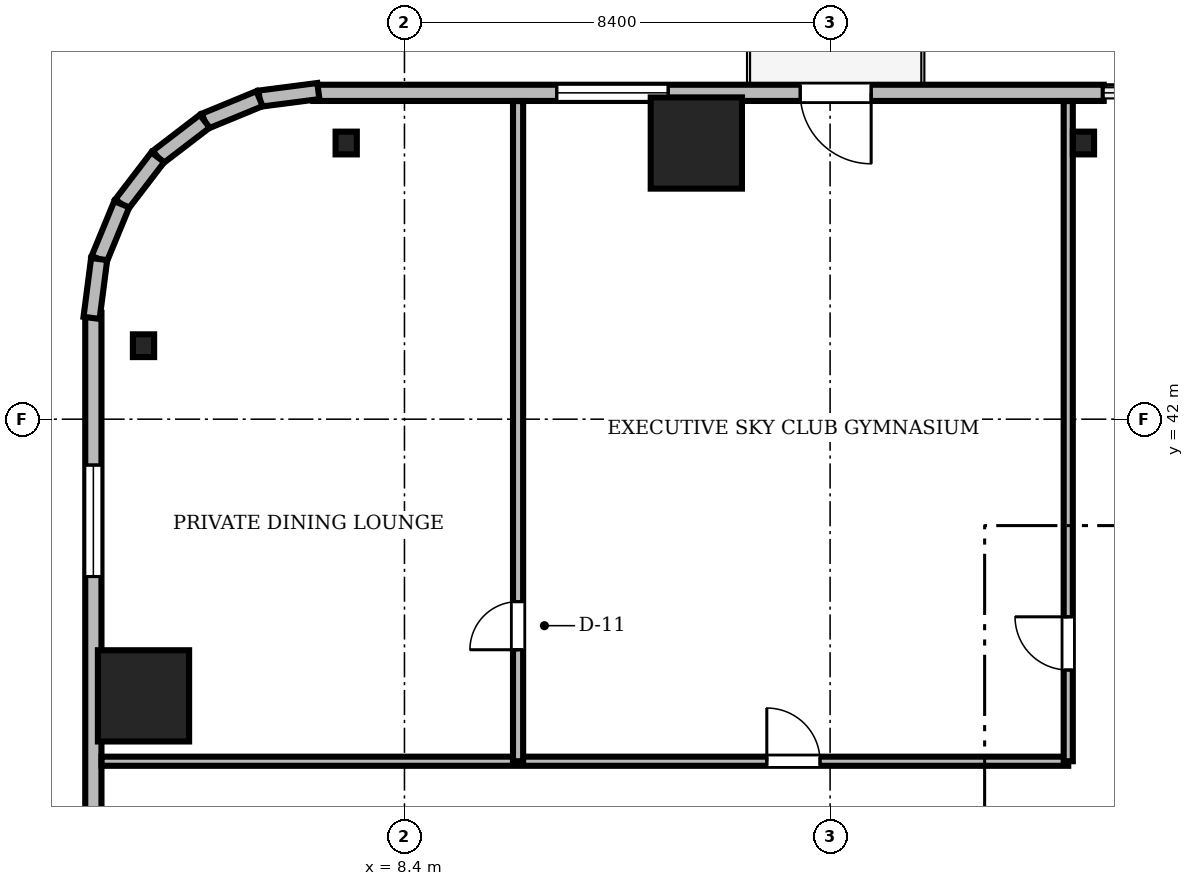
"""IFC4 building model, lengths in metres.
Left out: names, types, materials, properties, quantities, classifications, styles, units other than length and angle.
Written with IfcOpenShell. Run it as: python <this file> out.ifc"""

import sys

from ifc_helpers import new_model, si_unit, direction, frame, frame_2d, origin, origin_2d, place, context, subcontext, project, spatial, rectangle, i_section, extrude, source, transform, mapped, element, fill, save


model = new_model("IFC4")
c1 = context("Model", 3, precision=1e-05, world=origin(), true_north=direction((0.0, 1.0)))
c2 = subcontext(c1, "Body", "Model", "MODEL_VIEW")
j1 = project(units=[si_unit("LENGTHUNIT", "METRE"), si_unit("PLANEANGLEUNIT", "RADIAN")], contexts=[c1])
p1 = place(None, origin())
s1 = spatial("IfcSite", under=j1, at=p1, CompositionType="ELEMENT")
p2 = place(p1, origin())
s2 = spatial("IfcBuilding", under=s1, at=p2, CompositionType="ELEMENT")
p3 = place(p2, frame((0.0, 0.0, 38.55)))
s3 = spatial("IfcBuildingStorey", under=s2, at=p3, CompositionType="ELEMENT", Elevation=38.55)
m1 = source(origin(), c2, "Body", "SweptSolid", [
    extrude(rectangle(XDim=1.8, YDim=1.8, at=origin_2d()), origin(), (0.0, 0.0, 1.0), 3.41),
])
for number, where, z_axis, x_axis in (
    (1, (14.16, 47.45, 0.0), (0.0, 0.0, 1.0), (1.0, 0.0, 0.0)),
    (2, (3.25, 36.54, 0.0), (0.0, 0.0, 1.0), (1.0, 0.0, 0.0)),
):
    element("IfcColumn", number, at=place(p3, frame(where, z_axis=z_axis, x_axis=x_axis)), inside=s3, PredefinedType="COLUMN", context=c2, shape_type="MappedRepresentation", body=[
        mapped(m1, transform((0.0, 0.0, 0.0), scale=1.0)),
    ])
m2 = source(origin(), c2, "Body", "SweptSolid", [
    extrude(i_section(OverallWidth=0.419, OverallDepth=0.449, WebThickness=0.031, FlangeThickness=0.048, FilletRadius=0.015, at=origin_2d()), origin(), (0.0, 0.0, 1.0), 3.41),
])
for number, where, z_axis, x_axis in (
    (3, (21.8, 47.45, 0.0), (0.0, 0.0, 1.0), (1.0, 0.0, 0.0)),
    (4, (7.25, 47.45, 0.0), (0.0, 0.0, 1.0), (1.0, 0.0, 0.0)),
    (5, (3.25, 43.45, 0.0), (0.0, 0.0, 1.0), (1.0, 0.0, 0.0)),
):
    element("IfcColumn", number, at=place(p3, frame(where, z_axis=z_axis, x_axis=x_axis)), inside=s3, PredefinedType="COLUMN", context=c2, shape_type="MappedRepresentation", body=[
        mapped(m2, transform((0.0, 0.0, 0.0), scale=1.0)),
    ])
m3 = source(origin(), c2, "Body", "SweptSolid", [
    extrude(rectangle(XDim=15.6, YDim=0.32, at=frame_2d((7.8, 0.0))), origin(), (0.0, 0.0, 1.0), 3.41),
])
p4 = place(p3, frame((22.2, 48.44, 0.0), z_axis=(0.0, 0.0, 1.0), x_axis=(-1.0, 0.0, 0.0)))
e6 = element("IfcWall", 6, at=p4, inside=s3, PredefinedType="SOLIDWALL", context=c2, shape_type="MappedRepresentation", body=[
    mapped(m3, transform((0.0, 0.0, 0.0), scale=1.0)),
])
m4 = source(origin(), c2, "Body", "SweptSolid", [
    extrude(rectangle(XDim=1.4, YDim=2.3, at=frame_2d((0.7, 1.15))), frame((0.0, 0.17, 0.0), z_axis=(0.0, -1.0, 0.0), x_axis=(1.0, 0.0, 0.0)), (0.0, 0.0, 1.0), 0.34),
])
p5 = place(p4, frame((4.59, 0.0, 0.0)))
e7 = element("IfcOpeningElement", 7, at=p5, cuts=e6, PredefinedType="OPENING", context=c2, shape_type="MappedRepresentation", body=[
    mapped(m4, transform((0.0, 0.0, 0.0), scale=1.0)),
])
m5 = source(origin(), c2, "Body", "SweptSolid", [
    extrude(rectangle(XDim=2.2, YDim=2.4, at=frame_2d((1.1, 1.2))), frame((0.0, 0.17, 0.0), z_axis=(0.0, -1.0, 0.0), x_axis=(1.0, 0.0, 0.0)), (0.0, 0.0, 1.0), 0.34),
])
p6 = place(p4, frame((8.595, 0.0, 0.72)))
e8 = element("IfcOpeningElement", 8, at=p6, cuts=e6, PredefinedType="OPENING", context=c2, shape_type="MappedRepresentation", body=[
    mapped(m5, transform((0.0, 0.0, 0.0), scale=1.0)),
])
m6 = source(origin(), c2, "Body", "SweptSolid", [
    extrude(rectangle(XDim=15.6, YDim=0.32, at=frame_2d((7.8, 0.0))), origin(), (0.0, 0.0, 1.0), 3.41),
])
p7 = place(p3, frame((2.26, 44.1, 0.0), z_axis=(0.0, 0.0, 1.0), x_axis=(0.0, -1.0, 0.0)))
e9 = element("IfcWall", 9, at=p7, inside=s3, PredefinedType="SOLIDWALL", context=c2, shape_type="MappedRepresentation", body=[
    mapped(m6, transform((0.0, 0.0, 0.0), scale=1.0)),
])
p8 = place(p7, frame((3.005, 0.0, 0.72)))
e10 = element("IfcOpeningElement", 10, at=p8, cuts=e9, PredefinedType="OPENING", context=c2, shape_type="MappedRepresentation", body=[
    mapped(m5, transform((0.0, 0.0, 0.0), scale=1.0)),
])
m7 = source(origin(), c2, "Body", "SweptSolid", [
    extrude(rectangle(XDim=1.17, YDim=0.32, at=frame_2d((0.585, 0.0))), origin(), (0.0, 0.0, 1.0), 3.41),
])
p9 = place(p3, frame((6.7, 48.476, 0.0), z_axis=(0.0, 0.0, 1.0), x_axis=(-0.991735963317, -0.128295670475, 0.0)))
e11 = element("IfcWall", 11, at=p9, inside=s3, PredefinedType="SOLIDWALL", context=c2, shape_type="MappedRepresentation", body=[
    mapped(m7, transform((0.0, 0.0, 0.0), scale=1.0)),
])
m8 = source(origin(), c2, "Body", "SweptSolid", [
    extrude(rectangle(XDim=1.169, YDim=0.32, at=frame_2d((0.584, 0.0))), origin(), (0.0, 0.0, 1.0), 3.41),
])
p10 = place(p3, frame((5.54, 48.325, 0.0), z_axis=(0.0, 0.0, 1.0), x_axis=(-0.924552646638, -0.381054331552, 0.0)))
e12 = element("IfcWall", 12, at=p10, inside=s3, PredefinedType="SOLIDWALL", context=c2, shape_type="MappedRepresentation", body=[
    mapped(m8, transform((0.0, 0.0, 0.0), scale=1.0)),
])
m9 = source(origin(), c2, "Body", "SweptSolid", [
    extrude(rectangle(XDim=1.169, YDim=0.32, at=frame_2d((0.584, 0.0))), origin(), (0.0, 0.0, 1.0), 3.41),
])
p11 = place(p3, frame((4.459, 47.88, 0.0), z_axis=(0.0, 0.0, 1.0), x_axis=(-0.793663520347, -0.608356981114, 0.0)))
e13 = element("IfcWall", 13, at=p11, inside=s3, PredefinedType="SOLIDWALL", context=c2, shape_type="MappedRepresentation", body=[
    mapped(m9, transform((0.0, 0.0, 0.0), scale=1.0)),
])
m10 = source(origin(), c2, "Body", "SweptSolid", [
    extrude(rectangle(XDim=1.169, YDim=0.32, at=frame_2d((0.584, 0.0))), origin(), (0.0, 0.0, 1.0), 3.41),
])
p12 = place(p3, frame((3.531, 47.169, 0.0), z_axis=(0.0, 0.0, 1.0), x_axis=(-0.608387696831, -0.793639975269, 0.0)))
e14 = element("IfcWall", 14, at=p12, inside=s3, PredefinedType="SOLIDWALL", context=c2, shape_type="MappedRepresentation", body=[
    mapped(m10, transform((0.0, 0.0, 0.0), scale=1.0)),
])
p13 = place(p3, frame((2.82, 46.241, 0.0), z_axis=(0.0, 0.0, 1.0), x_axis=(-0.381054331552, -0.924552646638, 0.0)))
e15 = element("IfcWall", 15, at=p13, inside=s3, PredefinedType="SOLIDWALL", context=c2, shape_type="MappedRepresentation", body=[
    mapped(m8, transform((0.0, 0.0, 0.0), scale=1.0)),
])
p14 = place(p3, frame((2.375, 45.16, 0.0), z_axis=(0.0, 0.0, 1.0), x_axis=(-0.128295670475, -0.991735963317, 0.0)))
e16 = element("IfcWall", 16, at=p14, inside=s3, PredefinedType="SOLIDWALL", context=c2, shape_type="MappedRepresentation", body=[
    mapped(m7, transform((0.0, 0.0, 0.0), scale=1.0)),
])
m11 = source(origin(), c2, "Body", "SweptSolid", [
    extrude(rectangle(XDim=19.078, YDim=0.18, at=frame_2d((9.539, 0.0))), origin(), (0.0, 0.0, 1.0), 2.652),
])
p15 = place(p3, frame((2.422, 35.25, 0.0), z_axis=(0.0, 0.0, 1.0), x_axis=(1.0, 0.0, 0.0)))
e17 = element("IfcWall", 17, at=p15, inside=s3, PredefinedType="PARTITIONING", context=c2, shape_type="MappedRepresentation", body=[
    mapped(m11, transform((0.0, 0.0, 0.0), scale=1.0)),
])
m12 = source(origin(), c2, "Body", "SweptSolid", [
    extrude(rectangle(XDim=1.05, YDim=2.2, at=frame_2d((0.525, 1.1))), frame((0.0, 0.1, 0.0), z_axis=(0.0, -1.0, 0.0), x_axis=(1.0, 0.0, 0.0)), (0.0, 0.0, 1.0), 0.2),
])
p16 = place(p15, frame((13.129, 0.0, 0.0)))
e18 = element("IfcOpeningElement", 18, at=p16, cuts=e17, PredefinedType="OPENING", context=c2, shape_type="MappedRepresentation", body=[
    mapped(m12, transform((0.0, 0.0, 0.0), scale=1.0)),
])
m13 = source(origin(), c2, "Body", "SweptSolid", [
    extrude(rectangle(XDim=13.028, YDim=0.2, at=frame_2d((6.514, 0.0))), origin(), (0.0, 0.0, 1.0), 2.652),
])
p17 = place(p3, frame((10.642, 35.25, 0.0), z_axis=(0.0, 0.0, 1.0), x_axis=(0.0, 1.0, 0.0)))
e19 = element("IfcWall", 19, at=p17, inside=s3, PredefinedType="PARTITIONING", context=c2, shape_type="MappedRepresentation", body=[
    mapped(m13, transform((0.0, 0.0, 0.0), scale=1.0)),
])
m14 = source(origin(), c2, "Body", "SweptSolid", [
    extrude(rectangle(XDim=0.95, YDim=2.15, at=frame_2d((0.475, 1.075))), frame((0.0, 0.11, 0.0), z_axis=(0.0, -1.0, 0.0), x_axis=(1.0, 0.0, 0.0)), (0.0, 0.0, 1.0), 0.22),
])
p18 = place(p17, frame((2.2, 0.0, 0.0)))
e20 = element("IfcOpeningElement", 20, at=p18, cuts=e19, PredefinedType="OPENING", context=c2, shape_type="MappedRepresentation", body=[
    mapped(m14, transform((0.0, 0.0, 0.0), scale=1.0)),
])
m15 = source(origin(), c2, "Body", "SweptSolid", [
    extrude(rectangle(XDim=13.028, YDim=0.18, at=frame_2d((6.514, 0.0))), origin(), (0.0, 0.0, 1.0), 2.652),
])
p19 = place(p3, frame((21.5, 35.25, 0.0), z_axis=(0.0, 0.0, 1.0), x_axis=(0.0, 1.0, 0.0)))
e21 = element("IfcWall", 21, at=p19, inside=s3, PredefinedType="PARTITIONING", context=c2, shape_type="MappedRepresentation", body=[
    mapped(m15, transform((0.0, 0.0, 0.0), scale=1.0)),
])
p20 = place(p19, frame((1.8, 0.0, 0.0)))
e22 = element("IfcOpeningElement", 22, at=p20, cuts=e21, PredefinedType="OPENING", context=c2, shape_type="MappedRepresentation", body=[
    mapped(m12, transform((0.0, 0.0, 0.0), scale=1.0)),
])
m16 = source(origin(), c2, "Body", "SweptSolid", [
    extrude(rectangle(XDim=1.4, YDim=2.3, at=frame_2d((0.7, 1.15))), frame((0.0, 0.025, 0.0), z_axis=(0.0, -1.0, 0.0), x_axis=(1.0, 0.0, 0.0)), (0.0, 0.0, 1.0), 0.05),
])
p21 = place(p5, frame((1.4, 0.0, 0.0), z_axis=(0.0, 0.0, 1.0), x_axis=(-1.0, 0.0, 0.0)))
e23 = element("IfcDoor", 23, at=p21, inside=s3, OperationType="DOUBLE_DOOR_SLIDING", PredefinedType="DOOR", context=c2, shape_type="MappedRepresentation", body=[
    mapped(m16, transform((0.0, 0.0, 0.0), scale=1.0)),
])
fill(e7, e23)
m17 = source(origin(), c2, "Body", "SweptSolid", [
    extrude(rectangle(XDim=2.2, YDim=2.4, at=frame_2d((1.1, 1.2))), frame((0.0, 0.03, 0.0), z_axis=(0.0, -1.0, 0.0), x_axis=(1.0, 0.0, 0.0)), (0.0, 0.0, 1.0), 0.06),
])
p22 = place(p6, origin())
e24 = element("IfcWindow", 24, at=p22, inside=s3, PartitioningType="SINGLE_PANEL", PredefinedType="WINDOW", context=c2, shape_type="MappedRepresentation", body=[
    mapped(m17, transform((0.0, 0.0, 0.0), scale=1.0)),
])
fill(e8, e24)
p23 = place(p8, origin())
e25 = element("IfcWindow", 25, at=p23, inside=s3, PartitioningType="SINGLE_PANEL", PredefinedType="WINDOW", context=c2, shape_type="MappedRepresentation", body=[
    mapped(m17, transform((0.0, 0.0, 0.0), scale=1.0)),
])
fill(e10, e25)
m18 = source(origin(), c2, "Body", "SweptSolid", [
    extrude(rectangle(XDim=1.05, YDim=2.2, at=frame_2d((0.525, 1.1))), frame((0.0, 0.025, 0.0), z_axis=(0.0, -1.0, 0.0), x_axis=(1.0, 0.0, 0.0)), (0.0, 0.0, 1.0), 0.05),
])
p24 = place(p16, origin())
e26 = element("IfcDoor", 26, at=p24, inside=s3, OperationType="SINGLE_SWING_LEFT", PredefinedType="DOOR", context=c2, shape_type="MappedRepresentation", body=[
    mapped(m18, transform((0.0, 0.0, 0.0), scale=1.0)),
])
fill(e18, e26)
m19 = source(origin(), c2, "Body", "SweptSolid", [
    extrude(rectangle(XDim=0.95, YDim=2.15, at=frame_2d((0.475, 1.075))), frame((0.0, 0.025, 0.0), z_axis=(0.0, -1.0, 0.0), x_axis=(1.0, 0.0, 0.0)), (0.0, 0.0, 1.0), 0.05),
])
p25 = place(p18, origin())
e27 = element("IfcDoor", 27, at=p25, inside=s3, OperationType="SINGLE_SWING_LEFT", PredefinedType="DOOR", context=c2, shape_type="MappedRepresentation", body=[
    mapped(m19, transform((0.0, 0.0, 0.0), scale=1.0)),
])
fill(e20, e27)
p26 = place(p20, origin())
e28 = element("IfcDoor", 28, at=p26, inside=s3, OperationType="SINGLE_SWING_RIGHT", PredefinedType="DOOR", context=c2, shape_type="MappedRepresentation", body=[
    mapped(m18, transform((0.0, 0.0, 0.0), scale=1.0)),
])
fill(e22, e28)
save(model, sys.argv[1])
